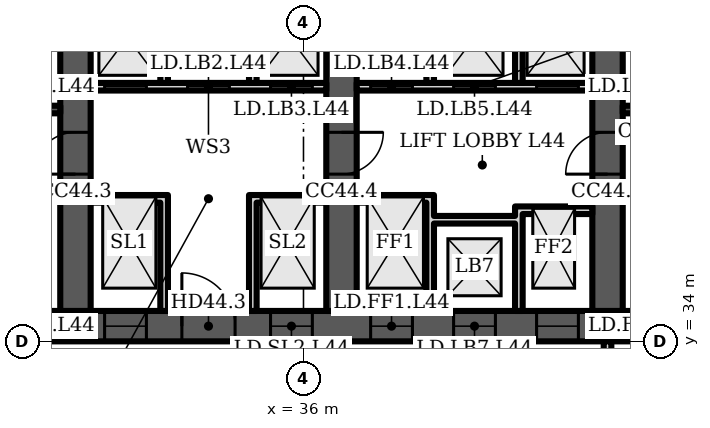
"""IFC4 building model, lengths in metres.
Left out: names, types, materials, properties, quantities, classifications, styles, units other than length and angle.
Written with IfcOpenShell. Run it as: python <this file> out.ifc"""

import sys

from ifc_helpers import new_model, si_unit, direction, frame, frame_2d, origin, place, context, subcontext, project, spatial, polyline, rectangle, outline, extrude, element, fill, save


model = new_model("IFC4")
c1 = context("Model", 3, precision=1e-05, world=origin(), true_north=direction((0.0, 1.0)))
c2 = subcontext(c1, "Body", "Model", "MODEL_VIEW")
j1 = project(units=[si_unit("LENGTHUNIT", "METRE"), si_unit("PLANEANGLEUNIT", "RADIAN")], contexts=[c1])
p1 = place(None, origin())
s1 = spatial("IfcSite", under=j1, at=p1, CompositionType="ELEMENT")
p2 = place(p1, origin())
s2 = spatial("IfcBuilding", under=s1, at=p2, CompositionType="ELEMENT")
p3 = place(p2, frame((0.0, 0.0, 180.7)))
s3 = spatial("IfcBuildingStorey", under=s2, at=p3, CompositionType="ELEMENT", Elevation=180.7)
p4 = place(p3, frame((16.0, 34.4, 0.0), z_axis=(0.0, 0.0, 1.0), x_axis=(1.0, 0.0, 0.0)))
e1 = element("IfcWall", 1, at=p4, inside=s3, PredefinedType="SHEAR", context=c2, shape_type="SweptSolid", body=[
    extrude(rectangle(XDim=42.0, YDim=0.8, at=frame_2d((21.0, 0.0))), origin(), (0.0, 0.0, 1.0), 3.6),
])
p5 = place(p4, frame((3.2, 0.0, 0.0)))
e2 = element("IfcOpeningElement", 2, at=p5, cuts=e1, PredefinedType="OPENING", context=c2, shape_type="SweptSolid", body=[
    extrude(rectangle(XDim=1.0, YDim=2.1, at=frame_2d((0.5, 1.05))), frame((0.0, 0.41, 0.0), z_axis=(0.0, -1.0, 0.0), x_axis=(1.0, 0.0, 0.0)), (0.0, 0.0, 1.0), 0.82),
])
p6 = place(p4, frame((7.65, 0.0, 0.0)))
e3 = element("IfcOpeningElement", 3, at=p6, cuts=e1, PredefinedType="OPENING", context=c2, shape_type="SweptSolid", body=[
    extrude(rectangle(XDim=1.2, YDim=2.1, at=frame_2d((0.6, 1.05))), frame((0.0, 0.41, 0.0), z_axis=(0.0, -1.0, 0.0), x_axis=(1.0, 0.0, 0.0)), (0.0, 0.0, 1.0), 0.82),
])
p7 = place(p4, frame((14.767, 0.0, 0.0)))
e4 = element("IfcOpeningElement", 4, at=p7, cuts=e1, PredefinedType="OPENING", context=c2, shape_type="SweptSolid", body=[
    extrude(rectangle(XDim=1.1, YDim=2.1, at=frame_2d((0.55, 1.05))), frame((0.0, 0.41, 0.0), z_axis=(0.0, -1.0, 0.0), x_axis=(1.0, 0.0, 0.0)), (0.0, 0.0, 1.0), 0.82),
])
p8 = place(p4, frame((19.133, 0.0, 0.0)))
e5 = element("IfcOpeningElement", 5, at=p8, cuts=e1, PredefinedType="OPENING", context=c2, shape_type="SweptSolid", body=[
    extrude(rectangle(XDim=1.1, YDim=2.1, at=frame_2d((0.55, 1.05))), frame((0.0, 0.41, 0.0), z_axis=(0.0, -1.0, 0.0), x_axis=(1.0, 0.0, 0.0)), (0.0, 0.0, 1.0), 0.82),
])
p9 = place(p4, frame((16.8, 0.0, 0.0)))
e6 = element("IfcOpeningElement", 6, at=p9, cuts=e1, PredefinedType="OPENING", context=c2, shape_type="SweptSolid", body=[
    extrude(rectangle(XDim=1.4, YDim=2.1, at=frame_2d((0.7, 1.05))), frame((0.0, 0.41, 0.0), z_axis=(0.0, -1.0, 0.0), x_axis=(1.0, 0.0, 0.0)), (0.0, 0.0, 1.0), 0.82),
])
p10 = place(p4, frame((21.767, 0.0, 0.0)))
e7 = element("IfcOpeningElement", 7, at=p10, cuts=e1, PredefinedType="OPENING", context=c2, shape_type="SweptSolid", body=[
    extrude(rectangle(XDim=1.1, YDim=2.1, at=frame_2d((0.55, 1.05))), frame((0.0, 0.41, 0.0), z_axis=(0.0, -1.0, 0.0), x_axis=(1.0, 0.0, 0.0)), (0.0, 0.0, 1.0), 0.82),
])
p11 = place(p4, frame((23.95, 0.0, 0.0)))
e8 = element("IfcOpeningElement", 8, at=p11, cuts=e1, PredefinedType="OPENING", context=c2, shape_type="SweptSolid", body=[
    extrude(rectangle(XDim=1.1, YDim=2.1, at=frame_2d((0.55, 1.05))), frame((0.0, 0.41, 0.0), z_axis=(0.0, -1.0, 0.0), x_axis=(1.0, 0.0, 0.0)), (0.0, 0.0, 1.0), 0.82),
])
p12 = place(p4, frame((26.133, 0.0, 0.0)))
e9 = element("IfcOpeningElement", 9, at=p12, cuts=e1, PredefinedType="OPENING", context=c2, shape_type="SweptSolid", body=[
    extrude(rectangle(XDim=1.1, YDim=2.1, at=frame_2d((0.55, 1.05))), frame((0.0, 0.41, 0.0), z_axis=(0.0, -1.0, 0.0), x_axis=(1.0, 0.0, 0.0)), (0.0, 0.0, 1.0), 0.82),
])
p13 = place(p4, frame((33.15, 0.0, 0.0)))
e10 = element("IfcOpeningElement", 10, at=p13, cuts=e1, PredefinedType="OPENING", context=c2, shape_type="SweptSolid", body=[
    extrude(rectangle(XDim=1.2, YDim=2.1, at=frame_2d((0.6, 1.05))), frame((0.0, 0.41, 0.0), z_axis=(0.0, -1.0, 0.0), x_axis=(1.0, 0.0, 0.0)), (0.0, 0.0, 1.0), 0.82),
])
p14 = place(p4, frame((37.767, 0.0, 0.0)))
e11 = element("IfcOpeningElement", 11, at=p14, cuts=e1, PredefinedType="OPENING", context=c2, shape_type="SweptSolid", body=[
    extrude(rectangle(XDim=1.4, YDim=2.1, at=frame_2d((0.7, 1.05))), frame((0.0, 0.41, 0.0), z_axis=(0.0, -1.0, 0.0), x_axis=(1.0, 0.0, 0.0)), (0.0, 0.0, 1.0), 0.82),
])
p15 = place(p3, frame((30.0, 34.8, 0.0), z_axis=(0.0, 0.0, 1.0), x_axis=(0.0, 1.0, 0.0)))
e12 = element("IfcWall", 12, at=p15, inside=s3, PredefinedType="SHEAR", context=c2, shape_type="SweptSolid", body=[
    extrude(rectangle(XDim=14.374, YDim=0.8, at=frame_2d((7.187, 0.0))), origin(), (0.0, 0.0, 1.0), 3.6),
])
p16 = place(p15, frame((3.6, 0.0, 0.0)))
e13 = element("IfcOpeningElement", 13, at=p16, cuts=e12, PredefinedType="OPENING", context=c2, shape_type="SweptSolid", body=[
    extrude(rectangle(XDim=1.1, YDim=2.1, at=frame_2d((0.55, 1.05))), frame((0.0, 0.41, 0.0), z_axis=(0.0, -1.0, 0.0), x_axis=(1.0, 0.0, 0.0)), (0.0, 0.0, 1.0), 0.82),
])
p17 = place(p3, frame((37.0, 34.8, 0.0), z_axis=(0.0, 0.0, 1.0), x_axis=(0.0, 1.0, 0.0)))
e14 = element("IfcWall", 14, at=p17, inside=s3, PredefinedType="SHEAR", context=c2, shape_type="SweptSolid", body=[
    extrude(rectangle(XDim=14.987, YDim=0.8, at=frame_2d((7.493, 0.0))), origin(), (0.0, 0.0, 1.0), 3.6),
])
p18 = place(p17, frame((11.312, 0.0, 0.0)))
e15 = element("IfcOpeningElement", 15, at=p18, cuts=e14, PredefinedType="OPENING", context=c2, shape_type="SweptSolid", body=[
    extrude(rectangle(XDim=1.0, YDim=2.1, at=frame_2d((0.5, 1.05))), frame((0.0, 0.41, 0.0), z_axis=(0.0, -1.0, 0.0), x_axis=(1.0, 0.0, 0.0)), (0.0, 0.0, 1.0), 0.82),
])
p19 = place(p17, frame((3.6, 0.0, 0.0)))
e16 = element("IfcOpeningElement", 16, at=p19, cuts=e14, PredefinedType="OPENING", context=c2, shape_type="SweptSolid", body=[
    extrude(rectangle(XDim=1.1, YDim=2.1, at=frame_2d((0.55, 1.05))), frame((0.0, 0.41, 0.0), z_axis=(0.0, -1.0, 0.0), x_axis=(1.0, 0.0, 0.0)), (0.0, 0.0, 1.0), 0.82),
])
p20 = place(p3, frame((44.0, 34.8, 0.0), z_axis=(0.0, 0.0, 1.0), x_axis=(0.0, 1.0, 0.0)))
e17 = element("IfcWall", 17, at=p20, inside=s3, PredefinedType="SHEAR", context=c2, shape_type="SweptSolid", body=[
    extrude(rectangle(XDim=14.374, YDim=0.8, at=frame_2d((7.187, 0.0))), origin(), (0.0, 0.0, 1.0), 3.6),
])
p21 = place(p20, frame((11.312, 0.0, 0.0)))
e18 = element("IfcOpeningElement", 18, at=p21, cuts=e17, PredefinedType="OPENING", context=c2, shape_type="SweptSolid", body=[
    extrude(rectangle(XDim=1.0, YDim=2.1, at=frame_2d((0.5, 1.05))), frame((0.0, 0.41, 0.0), z_axis=(0.0, -1.0, 0.0), x_axis=(1.0, 0.0, 0.0)), (0.0, 0.0, 1.0), 0.82),
])
p22 = place(p20, frame((3.6, 0.0, 0.0)))
e19 = element("IfcOpeningElement", 19, at=p22, cuts=e17, PredefinedType="OPENING", context=c2, shape_type="SweptSolid", body=[
    extrude(rectangle(XDim=1.1, YDim=2.1, at=frame_2d((0.55, 1.05))), frame((0.0, 0.41, 0.0), z_axis=(0.0, -1.0, 0.0), x_axis=(1.0, 0.0, 0.0)), (0.0, 0.0, 1.0), 0.82),
])
p23 = place(p3, frame((23.4, 40.1, 0.0), z_axis=(0.0, 0.0, 1.0), x_axis=(1.0, 0.0, 0.0)))
e20 = element("IfcWall", 20, at=p23, inside=s3, PredefinedType="SHEAR", context=c2, shape_type="SweptSolid", body=[
    extrude(rectangle(XDim=6.2, YDim=0.2, at=frame_2d((3.1, 0.0))), origin(), (0.0, 0.0, 1.0), 3.2),
])
p24 = place(p23, frame((3.525, 0.0, 0.0)))
e21 = element("IfcOpeningElement", 21, at=p24, cuts=e20, PredefinedType="OPENING", context=c2, shape_type="SweptSolid", body=[
    extrude(rectangle(XDim=1.2, YDim=2.1, at=frame_2d((0.6, 1.05))), frame((0.0, 0.11, 0.0), z_axis=(0.0, -1.0, 0.0), x_axis=(1.0, 0.0, 0.0)), (0.0, 0.0, 1.0), 0.22),
])
p25 = place(p23, frame((0.575, 0.0, 0.0)))
e22 = element("IfcOpeningElement", 22, at=p25, cuts=e20, PredefinedType="OPENING", context=c2, shape_type="SweptSolid", body=[
    extrude(rectangle(XDim=0.9, YDim=2.1, at=frame_2d((0.45, 1.05))), frame((0.0, 0.11, 0.0), z_axis=(0.0, -1.0, 0.0), x_axis=(1.0, 0.0, 0.0)), (0.0, 0.0, 1.0), 0.22),
])
p26 = place(p3, frame((30.4, 40.7, 0.0), z_axis=(0.0, 0.0, 1.0), x_axis=(1.0, 0.0, 0.0)))
e23 = element("IfcWall", 23, at=p26, inside=s3, PredefinedType="PARTITIONING", context=c2, shape_type="SweptSolid", body=[
    extrude(rectangle(XDim=6.2, YDim=0.2, at=frame_2d((3.1, 0.0))), origin(), (0.0, 0.0, 1.0), 3.2),
])
p27 = place(p26, frame((0.367, 0.0, 0.0)))
e24 = element("IfcOpeningElement", 24, at=p27, cuts=e23, PredefinedType="OPENING", context=c2, shape_type="SweptSolid", body=[
    extrude(rectangle(XDim=1.1, YDim=2.1, at=frame_2d((0.55, 1.05))), frame((0.0, 0.11, 0.0), z_axis=(0.0, -1.0, 0.0), x_axis=(1.0, 0.0, 0.0)), (0.0, 0.0, 1.0), 0.22),
])
p28 = place(p26, frame((2.55, 0.0, 0.0)))
e25 = element("IfcOpeningElement", 25, at=p28, cuts=e23, PredefinedType="OPENING", context=c2, shape_type="SweptSolid", body=[
    extrude(rectangle(XDim=1.1, YDim=2.1, at=frame_2d((0.55, 1.05))), frame((0.0, 0.11, 0.0), z_axis=(0.0, -1.0, 0.0), x_axis=(1.0, 0.0, 0.0)), (0.0, 0.0, 1.0), 0.22),
])
p29 = place(p26, frame((4.733, 0.0, 0.0)))
e26 = element("IfcOpeningElement", 26, at=p29, cuts=e23, PredefinedType="OPENING", context=c2, shape_type="SweptSolid", body=[
    extrude(rectangle(XDim=1.1, YDim=2.1, at=frame_2d((0.55, 1.05))), frame((0.0, 0.11, 0.0), z_axis=(0.0, -1.0, 0.0), x_axis=(1.0, 0.0, 0.0)), (0.0, 0.0, 1.0), 0.22),
])
p30 = place(p3, frame((0.0, 0.0, -0.0)))
e27 = element("IfcWall", 27, at=p30, inside=s3, PredefinedType="PARTITIONING", context=c2, shape_type="SweptSolid", body=[
    extrude(outline(polyline([(32.233, 37.65), (30.4, 37.65), (30.4, 37.85), (32.233, 37.85), (32.433, 37.85), (32.433, 34.8), (32.233, 34.8), (32.233, 37.65)])), origin(), (0.0, 0.0, 1.0), 3.2),
])
p31 = place(p3, frame((0.0, 0.0, -0.0)))
e28 = element("IfcWall", 28, at=p31, inside=s3, PredefinedType="PARTITIONING", context=c2, shape_type="SweptSolid", body=[
    extrude(outline(polyline([(34.567, 37.85), (34.767, 37.85), (36.6, 37.85), (36.6, 37.65), (34.767, 37.65), (34.767, 34.8), (34.567, 34.8), (34.567, 37.85)])), origin(), (0.0, 0.0, 1.0), 3.2),
])
p32 = place(p3, frame((0.0, 0.0, -0.0)))
e29 = element("IfcWall", 29, at=p32, inside=s3, PredefinedType="PARTITIONING", context=c2, shape_type="SweptSolid", body=[
    extrude(outline(polyline([(32.433, 40.8), (32.233, 40.8), (32.233, 43.8), (30.4, 43.8), (30.4, 44.0), (36.6, 44.0), (36.6, 43.8), (34.767, 43.8), (34.767, 40.8), (34.567, 40.8), (34.567, 43.8), (32.433, 43.8), (32.433, 40.8)])), origin(), (0.0, 0.0, 1.0), 3.2),
])
p33 = place(p3, frame((37.4, 40.7, 0.0), z_axis=(0.0, 0.0, 1.0), x_axis=(1.0, 0.0, 0.0)))
e30 = element("IfcWall", 30, at=p33, inside=s3, PredefinedType="PARTITIONING", context=c2, shape_type="SweptSolid", body=[
    extrude(rectangle(XDim=6.2, YDim=0.2, at=frame_2d((3.1, 0.0))), origin(), (0.0, 0.0, 1.0), 3.2),
])
p34 = place(p33, frame((0.367, 0.0, 0.0)))
e31 = element("IfcOpeningElement", 31, at=p34, cuts=e30, PredefinedType="OPENING", context=c2, shape_type="SweptSolid", body=[
    extrude(rectangle(XDim=1.1, YDim=2.1, at=frame_2d((0.55, 1.05))), frame((0.0, 0.11, 0.0), z_axis=(0.0, -1.0, 0.0), x_axis=(1.0, 0.0, 0.0)), (0.0, 0.0, 1.0), 0.22),
])
p35 = place(p33, frame((2.55, 0.0, 0.0)))
e32 = element("IfcOpeningElement", 32, at=p35, cuts=e30, PredefinedType="OPENING", context=c2, shape_type="SweptSolid", body=[
    extrude(rectangle(XDim=1.1, YDim=2.1, at=frame_2d((0.55, 1.05))), frame((0.0, 0.11, 0.0), z_axis=(0.0, -1.0, 0.0), x_axis=(1.0, 0.0, 0.0)), (0.0, 0.0, 1.0), 0.22),
])
p36 = place(p33, frame((4.733, 0.0, 0.0)))
e33 = element("IfcOpeningElement", 33, at=p36, cuts=e30, PredefinedType="OPENING", context=c2, shape_type="SweptSolid", body=[
    extrude(rectangle(XDim=1.1, YDim=2.1, at=frame_2d((0.55, 1.05))), frame((0.0, 0.11, 0.0), z_axis=(0.0, -1.0, 0.0), x_axis=(1.0, 0.0, 0.0)), (0.0, 0.0, 1.0), 0.22),
])
p37 = place(p3, frame((0.0, 0.0, -0.0)))
e34 = element("IfcWall", 34, at=p37, inside=s3, PredefinedType="PARTITIONING", context=c2, shape_type="SweptSolid", body=[
    extrude(outline(polyline([(41.567, 37.1), (39.433, 37.1), (39.433, 34.8), (39.233, 34.8), (39.233, 37.65), (37.4, 37.65), (37.4, 37.85), (39.233, 37.85), (39.433, 37.85), (39.433, 37.3), (41.567, 37.3), (41.567, 37.55), (41.767, 37.55), (43.6, 37.55), (43.6, 37.35), (41.767, 37.35), (41.767, 34.8), (41.567, 34.8), (41.567, 37.1)])), origin(), (0.0, 0.0, 1.0), 3.2),
])
p38 = place(p3, frame((0.0, 0.0, -0.0)))
e35 = element("IfcWall", 35, at=p38, inside=s3, PredefinedType="PARTITIONING", context=c2, shape_type="SweptSolid", body=[
    extrude(outline(polyline([(39.433, 40.8), (39.233, 40.8), (39.233, 43.8), (37.4, 43.8), (37.4, 44.0), (43.6, 44.0), (43.6, 43.8), (41.767, 43.8), (41.767, 40.8), (41.567, 40.8), (41.567, 43.8), (39.433, 43.8), (39.433, 40.8)])), origin(), (0.0, 0.0, 1.0), 3.2),
])
p39 = place(p3, frame((44.4, 40.1, 0.0), z_axis=(0.0, 0.0, 1.0), x_axis=(1.0, 0.0, 0.0)))
e36 = element("IfcWall", 36, at=p39, inside=s3, PredefinedType="SHEAR", context=c2, shape_type="SweptSolid", body=[
    extrude(rectangle(XDim=6.2, YDim=0.2, at=frame_2d((3.1, 0.0))), origin(), (0.0, 0.0, 1.0), 3.2),
])
p40 = place(p39, frame((3.525, 0.0, 0.0)))
e37 = element("IfcOpeningElement", 37, at=p40, cuts=e36, PredefinedType="OPENING", context=c2, shape_type="SweptSolid", body=[
    extrude(rectangle(XDim=1.2, YDim=2.1, at=frame_2d((0.6, 1.05))), frame((0.0, 0.11, 0.0), z_axis=(0.0, -1.0, 0.0), x_axis=(1.0, 0.0, 0.0)), (0.0, 0.0, 1.0), 0.22),
])
p41 = place(p39, frame((0.575, 0.0, 0.0)))
e38 = element("IfcOpeningElement", 38, at=p41, cuts=e36, PredefinedType="OPENING", context=c2, shape_type="SweptSolid", body=[
    extrude(rectangle(XDim=0.9, YDim=2.1, at=frame_2d((0.45, 1.05))), frame((0.0, 0.11, 0.0), z_axis=(0.0, -1.0, 0.0), x_axis=(1.0, 0.0, 0.0)), (0.0, 0.0, 1.0), 0.22),
])
p42 = place(p3, frame((37.0, 30.5, 0.0), z_axis=(0.0, 0.0, 1.0), x_axis=(0.0, 1.0, 0.0)))
e39 = element("IfcWall", 39, at=p42, inside=s3, PredefinedType="PARTITIONING", context=c2, shape_type="SweptSolid", body=[
    extrude(rectangle(XDim=3.5, YDim=0.2, at=frame_2d((1.75, 0.0))), origin(), (0.0, 0.0, 1.0), 3.2),
])
p43 = place(p42, frame((1.2, 0.0, 0.0)))
e40 = element("IfcOpeningElement", 40, at=p43, cuts=e39, PredefinedType="OPENING", context=c2, shape_type="SweptSolid", body=[
    extrude(rectangle(XDim=1.1, YDim=2.1, at=frame_2d((0.55, 1.05))), frame((0.0, 0.11, 0.0), z_axis=(0.0, -1.0, 0.0), x_axis=(1.0, 0.0, 0.0)), (0.0, 0.0, 1.0), 0.22),
])
for number, where, z_axis, x_axis in (
    (41, (40.0, 30.5, 0.0), (0.0, 0.0, 1.0), (0.0, 1.0, 0.0)),
    (42, (41.0, 30.5, 0.0), (0.0, 0.0, 1.0), (0.0, 1.0, 0.0)),
):
    element("IfcWall", number, at=place(p3, frame(where, z_axis=z_axis, x_axis=x_axis)), inside=s3, PredefinedType="PARTITIONING", context=c2, shape_type="SweptSolid", body=[
        extrude(rectangle(XDim=3.5, YDim=0.2, at=frame_2d((1.75, 0.0))), origin(), (0.0, 0.0, 1.0), 3.2),
    ])
p44 = place(p3, frame((44.0, 30.5, 0.0), z_axis=(0.0, 0.0, 1.0), x_axis=(0.0, 1.0, 0.0)))
e43 = element("IfcWall", 43, at=p44, inside=s3, PredefinedType="PARTITIONING", context=c2, shape_type="SweptSolid", body=[
    extrude(rectangle(XDim=3.5, YDim=0.2, at=frame_2d((1.75, 0.0))), origin(), (0.0, 0.0, 1.0), 3.2),
])
p45 = place(p44, frame((1.2, 0.0, 0.0)))
e44 = element("IfcOpeningElement", 44, at=p45, cuts=e43, PredefinedType="OPENING", context=c2, shape_type="SweptSolid", body=[
    extrude(rectangle(XDim=1.1, YDim=2.1, at=frame_2d((0.55, 1.05))), frame((0.0, 0.11, 0.0), z_axis=(0.0, -1.0, 0.0), x_axis=(1.0, 0.0, 0.0)), (0.0, 0.0, 1.0), 0.22),
])
p46 = place(p7, origin())
e45 = element("IfcDoor", 45, at=p46, inside=s3, OperationType="DOUBLE_DOOR_SLIDING", PredefinedType="DOOR", context=c2, shape_type="SweptSolid", body=[
    extrude(rectangle(XDim=1.1, YDim=2.1, at=frame_2d((0.55, 1.05))), frame((0.0, 0.025, 0.0), z_axis=(0.0, -1.0, 0.0), x_axis=(1.0, 0.0, 0.0)), (0.0, 0.0, 1.0), 0.05),
])
fill(e4, e45)
p47 = place(p8, origin())
e46 = element("IfcDoor", 46, at=p47, inside=s3, OperationType="DOUBLE_DOOR_SLIDING", PredefinedType="DOOR", context=c2, shape_type="SweptSolid", body=[
    extrude(rectangle(XDim=1.1, YDim=2.1, at=frame_2d((0.55, 1.05))), frame((0.0, 0.025, 0.0), z_axis=(0.0, -1.0, 0.0), x_axis=(1.0, 0.0, 0.0)), (0.0, 0.0, 1.0), 0.05),
])
fill(e5, e46)
p48 = place(p9, origin())
e47 = element("IfcDoor", 47, at=p48, inside=s3, OperationType="DOUBLE_DOOR_SINGLE_SWING", PredefinedType="DOOR", context=c2, shape_type="SweptSolid", body=[
    extrude(rectangle(XDim=1.4, YDim=2.1, at=frame_2d((0.7, 1.05))), frame((0.0, 0.025, 0.0), z_axis=(0.0, -1.0, 0.0), x_axis=(1.0, 0.0, 0.0)), (0.0, 0.0, 1.0), 0.05),
])
fill(e6, e47)
p49 = place(p27, origin())
e48 = element("IfcDoor", 48, at=p49, inside=s3, OperationType="DOUBLE_DOOR_SLIDING", PredefinedType="DOOR", context=c2, shape_type="SweptSolid", body=[
    extrude(rectangle(XDim=1.1, YDim=2.1, at=frame_2d((0.55, 1.05))), frame((0.0, 0.025, 0.0), z_axis=(0.0, -1.0, 0.0), x_axis=(1.0, 0.0, 0.0)), (0.0, 0.0, 1.0), 0.05),
])
fill(e24, e48)
p50 = place(p28, origin())
e49 = element("IfcDoor", 49, at=p50, inside=s3, OperationType="DOUBLE_DOOR_SLIDING", PredefinedType="DOOR", context=c2, shape_type="SweptSolid", body=[
    extrude(rectangle(XDim=1.1, YDim=2.1, at=frame_2d((0.55, 1.05))), frame((0.0, 0.025, 0.0), z_axis=(0.0, -1.0, 0.0), x_axis=(1.0, 0.0, 0.0)), (0.0, 0.0, 1.0), 0.05),
])
fill(e25, e49)
p51 = place(p29, origin())
e50 = element("IfcDoor", 50, at=p51, inside=s3, OperationType="DOUBLE_DOOR_SLIDING", PredefinedType="DOOR", context=c2, shape_type="SweptSolid", body=[
    extrude(rectangle(XDim=1.1, YDim=2.1, at=frame_2d((0.55, 1.05))), frame((0.0, 0.025, 0.0), z_axis=(0.0, -1.0, 0.0), x_axis=(1.0, 0.0, 0.0)), (0.0, 0.0, 1.0), 0.05),
])
fill(e26, e50)
p52 = place(p10, origin())
e51 = element("IfcDoor", 51, at=p52, inside=s3, OperationType="DOUBLE_DOOR_SLIDING", PredefinedType="DOOR", context=c2, shape_type="SweptSolid", body=[
    extrude(rectangle(XDim=1.1, YDim=2.1, at=frame_2d((0.55, 1.05))), frame((0.0, 0.025, 0.0), z_axis=(0.0, -1.0, 0.0), x_axis=(1.0, 0.0, 0.0)), (0.0, 0.0, 1.0), 0.05),
])
fill(e7, e51)
p53 = place(p11, origin())
e52 = element("IfcDoor", 52, at=p53, inside=s3, OperationType="DOUBLE_DOOR_SLIDING", PredefinedType="DOOR", context=c2, shape_type="SweptSolid", body=[
    extrude(rectangle(XDim=1.1, YDim=2.1, at=frame_2d((0.55, 1.05))), frame((0.0, 0.025, 0.0), z_axis=(0.0, -1.0, 0.0), x_axis=(1.0, 0.0, 0.0)), (0.0, 0.0, 1.0), 0.05),
])
fill(e8, e52)
p54 = place(p12, origin())
e53 = element("IfcDoor", 53, at=p54, inside=s3, OperationType="DOUBLE_DOOR_SLIDING", PredefinedType="DOOR", context=c2, shape_type="SweptSolid", body=[
    extrude(rectangle(XDim=1.1, YDim=2.1, at=frame_2d((0.55, 1.05))), frame((0.0, 0.025, 0.0), z_axis=(0.0, -1.0, 0.0), x_axis=(1.0, 0.0, 0.0)), (0.0, 0.0, 1.0), 0.05),
])
fill(e9, e53)
p55 = place(p34, origin())
e54 = element("IfcDoor", 54, at=p55, inside=s3, OperationType="DOUBLE_DOOR_SLIDING", PredefinedType="DOOR", context=c2, shape_type="SweptSolid", body=[
    extrude(rectangle(XDim=1.1, YDim=2.1, at=frame_2d((0.55, 1.05))), frame((0.0, 0.025, 0.0), z_axis=(0.0, -1.0, 0.0), x_axis=(1.0, 0.0, 0.0)), (0.0, 0.0, 1.0), 0.05),
])
fill(e31, e54)
p56 = place(p35, origin())
e55 = element("IfcDoor", 55, at=p56, inside=s3, OperationType="DOUBLE_DOOR_SLIDING", PredefinedType="DOOR", context=c2, shape_type="SweptSolid", body=[
    extrude(rectangle(XDim=1.1, YDim=2.1, at=frame_2d((0.55, 1.05))), frame((0.0, 0.025, 0.0), z_axis=(0.0, -1.0, 0.0), x_axis=(1.0, 0.0, 0.0)), (0.0, 0.0, 1.0), 0.05),
])
fill(e32, e55)
p57 = place(p36, origin())
e56 = element("IfcDoor", 56, at=p57, inside=s3, OperationType="DOUBLE_DOOR_SLIDING", PredefinedType="DOOR", context=c2, shape_type="SweptSolid", body=[
    extrude(rectangle(XDim=1.1, YDim=2.1, at=frame_2d((0.55, 1.05))), frame((0.0, 0.025, 0.0), z_axis=(0.0, -1.0, 0.0), x_axis=(1.0, 0.0, 0.0)), (0.0, 0.0, 1.0), 0.05),
])
fill(e33, e56)
p58 = place(p16, origin())
e57 = element("IfcDoor", 57, at=p58, inside=s3, OperationType="SINGLE_SWING_LEFT", PredefinedType="DOOR", context=c2, shape_type="SweptSolid", body=[
    extrude(rectangle(XDim=1.1, YDim=2.1, at=frame_2d((0.55, 1.05))), frame((0.0, 0.025, 0.0), z_axis=(0.0, -1.0, 0.0), x_axis=(1.0, 0.0, 0.0)), (0.0, 0.0, 1.0), 0.05),
])
fill(e13, e57)
p59 = place(p19, origin())
e58 = element("IfcDoor", 58, at=p59, inside=s3, OperationType="SINGLE_SWING_RIGHT", PredefinedType="DOOR", context=c2, shape_type="SweptSolid", body=[
    extrude(rectangle(XDim=1.1, YDim=2.1, at=frame_2d((0.55, 1.05))), frame((0.0, 0.025, 0.0), z_axis=(0.0, -1.0, 0.0), x_axis=(1.0, 0.0, 0.0)), (0.0, 0.0, 1.0), 0.05),
])
fill(e16, e58)
p60 = place(p22, origin())
e59 = element("IfcDoor", 59, at=p60, inside=s3, OperationType="SINGLE_SWING_LEFT", PredefinedType="DOOR", context=c2, shape_type="SweptSolid", body=[
    extrude(rectangle(XDim=1.1, YDim=2.1, at=frame_2d((0.55, 1.05))), frame((0.0, 0.025, 0.0), z_axis=(0.0, -1.0, 0.0), x_axis=(1.0, 0.0, 0.0)), (0.0, 0.0, 1.0), 0.05),
])
fill(e19, e59)
save(model, sys.argv[1])
